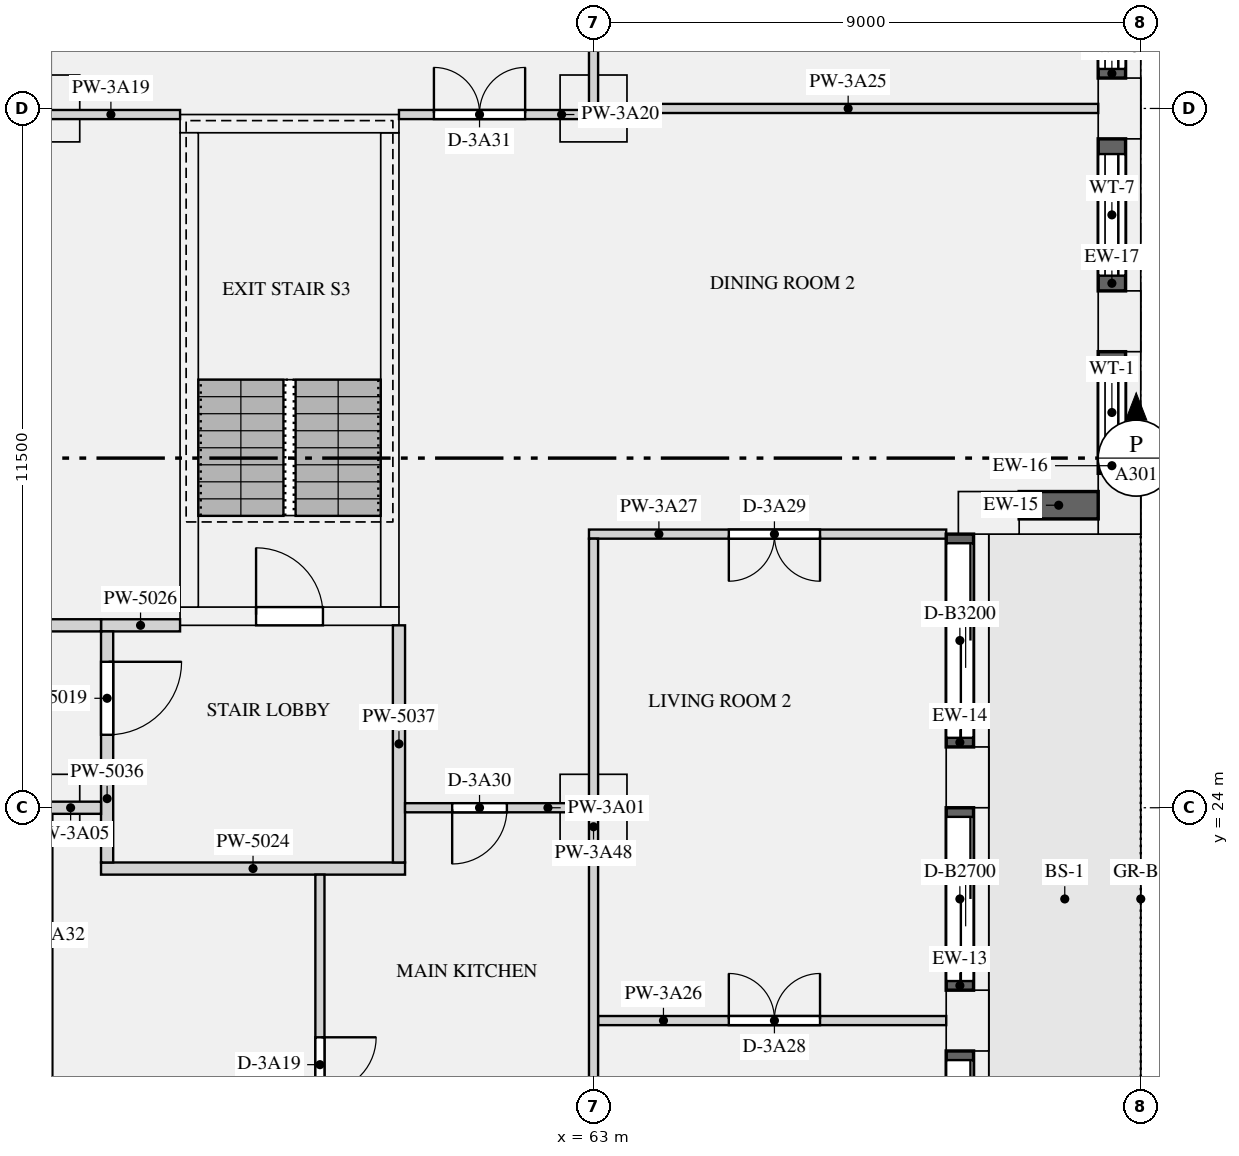
"""IFC4 building model, lengths in metres.
Left out: names, types, materials, properties, quantities, classifications, styles, units other than length and angle.
Written with IfcOpenShell. Run it as: python <this file> out.ifc"""

import sys

from ifc_helpers import new_model, si_unit, direction, frame, frame_2d, origin, origin_2d, place, context, subcontext, project, spatial, rectangle, extrude, element, fill, save


model = new_model("IFC4")
c1 = context("Model", 3, precision=1e-05, world=origin(), true_north=direction((0.0, 1.0)))
c2 = subcontext(c1, "Body", "Model", "MODEL_VIEW")
j1 = project(units=[si_unit("LENGTHUNIT", "METRE"), si_unit("PLANEANGLEUNIT", "RADIAN")], contexts=[c1])
p1 = place(None, origin())
s1 = spatial("IfcSite", under=j1, at=p1, CompositionType="ELEMENT")
p2 = place(p1, origin())
s2 = spatial("IfcBuilding", under=s1, at=p2, CompositionType="ELEMENT")
p3 = place(p2, frame((0.0, 0.0, 144.45)))
s3 = spatial("IfcBuildingStorey", under=s2, at=p3, CompositionType="ELEMENT", Elevation=144.45)
for number, where, z_axis, x_axis in (
    (1, (69.15, 20.5, 0.0), (0.0, 0.0, 1.0), (0.0, 1.0, 0.0)),
    (2, (69.15, 24.5, 0.0), (0.0, 0.0, 1.0), (0.0, 1.0, 0.0)),
    (3, (69.5, 28.85, 0.0), (0.0, 0.0, 1.0), (1.0, 0.0, 0.0)),
    (4, (71.65, 29.0, 0.0), (0.0, 0.0, 1.0), (0.0, 1.0, 0.0)),
    (5, (71.65, 32.0, 0.0), (0.0, 0.0, 1.0), (0.0, 1.0, 0.0)),
    (6, (71.65, 35.5, 0.0), (0.0, 0.0, 1.0), (0.0, 1.0, 0.0)),
):
    element("IfcColumn", number, at=place(p3, frame(where, z_axis=z_axis, x_axis=x_axis)), inside=s3, PredefinedType="USERDEFINED", context=c2, shape_type="SweptSolid", body=[
        extrude(rectangle(XDim=1.0, YDim=0.7, at=origin_2d()), origin(), (0.0, 0.0, 1.0), 3.15),
    ])
for number, where, z_axis, x_axis in (
    (7, (54.0, 24.0, 0.0), (0.0, 0.0, 1.0), (1.0, 0.0, 0.0)),
    (8, (63.0, 24.0, 0.0), (0.0, 0.0, 1.0), (1.0, 0.0, 0.0)),
    (9, (54.0, 35.5, 0.0), (0.0, 0.0, 1.0), (1.0, 0.0, 0.0)),
    (10, (63.0, 35.5, 0.0), (0.0, 0.0, 1.0), (1.0, 0.0, 0.0)),
):
    element("IfcColumn", number, at=place(p3, frame(where, z_axis=z_axis, x_axis=x_axis)), inside=s3, PredefinedType="COLUMN", context=c2, shape_type="SweptSolid", body=[
        extrude(rectangle(XDim=1.1, YDim=1.1, at=origin_2d()), origin(), (0.0, 0.0, 1.0), 3.15),
    ])
p4 = place(p3, frame((56.2, 27.15, 0.0), z_axis=(0.0, 0.0, 1.0), x_axis=(1.0, 0.0, 0.0)))
e11 = element("IfcWall", 11, at=p4, inside=s3, PredefinedType="SHEAR", context=c2, shape_type="SweptSolid", body=[
    extrude(rectangle(XDim=3.6, YDim=0.3, at=frame_2d((1.8, 0.0))), origin(), (0.0, 0.0, 1.0), 3.15),
])
p5 = place(p4, frame((1.25, 0.0, 0.0)))
e12 = element("IfcOpeningElement", 12, at=p5, cuts=e11, PredefinedType="OPENING", context=c2, shape_type="SweptSolid", body=[
    extrude(rectangle(XDim=1.1, YDim=2.1, at=frame_2d((0.55, 1.05))), frame((0.0, 0.16, 0.0), z_axis=(0.0, -1.0, 0.0), x_axis=(1.0, 0.0, 0.0)), (0.0, 0.0, 1.0), 0.32),
])
p6 = place(p3, frame((56.2, 35.25, 0.0), z_axis=(0.0, 0.0, 1.0), x_axis=(1.0, 0.0, 0.0)))
e13 = element("IfcWall", 13, at=p6, inside=s3, PredefinedType="SHEAR", context=c2, shape_type="SweptSolid", body=[
    extrude(rectangle(XDim=3.6, YDim=0.3, at=frame_2d((1.8, 0.0))), origin(), (0.0, 0.0, 1.0), 3.15),
])
for number, where, z_axis, x_axis in (
    (14, (56.35, 27.3, 0.0), (0.0, 0.0, 1.0), (0.0, 1.0, 0.0)),
    (15, (59.65, 27.3, 0.0), (0.0, 0.0, 1.0), (0.0, 1.0, 0.0)),
):
    element("IfcWall", number, at=place(p3, frame(where, z_axis=z_axis, x_axis=x_axis)), inside=s3, PredefinedType="SHEAR", context=c2, shape_type="SweptSolid", body=[
        extrude(rectangle(XDim=7.8, YDim=0.3, at=frame_2d((3.9, 0.0))), origin(), (0.0, 0.0, 1.0), 3.15),
    ])
p7 = place(p3, frame((69.025, 17.0, 0.0), z_axis=(0.0, 0.0, 1.0), x_axis=(0.0, 1.0, 0.0)))
e16 = element("IfcWall", 16, at=p7, inside=s3, PredefinedType="SOLIDWALL", context=c2, shape_type="SweptSolid", body=[
    extrude(rectangle(XDim=3.0, YDim=0.45, at=frame_2d((1.5, 0.0))), origin(), (0.0, 0.0, 1.0), 2.83),
])
p8 = place(p7, frame((0.15, 0.0, 0.0)))
e17 = element("IfcOpeningElement", 17, at=p8, cuts=e16, PredefinedType="OPENING", context=c2, shape_type="SweptSolid", body=[
    extrude(rectangle(XDim=2.7, YDim=2.3, at=frame_2d((1.35, 1.15))), frame((0.0, 0.235, 0.0), z_axis=(0.0, -1.0, 0.0), x_axis=(1.0, 0.0, 0.0)), (0.0, 0.0, 1.0), 0.47),
])
p9 = place(p3, frame((69.025, 21.0, 0.0), z_axis=(0.0, 0.0, 1.0), x_axis=(0.0, 1.0, 0.0)))
e18 = element("IfcWall", 18, at=p9, inside=s3, PredefinedType="SOLIDWALL", context=c2, shape_type="SweptSolid", body=[
    extrude(rectangle(XDim=3.0, YDim=0.45, at=frame_2d((1.5, 0.0))), origin(), (0.0, 0.0, 1.0), 2.83),
])
p10 = place(p9, frame((0.15, 0.0, 0.0)))
e19 = element("IfcOpeningElement", 19, at=p10, cuts=e18, PredefinedType="OPENING", context=c2, shape_type="SweptSolid", body=[
    extrude(rectangle(XDim=2.7, YDim=2.3, at=frame_2d((1.35, 1.15))), frame((0.0, 0.235, 0.0), z_axis=(0.0, -1.0, 0.0), x_axis=(1.0, 0.0, 0.0)), (0.0, 0.0, 1.0), 0.47),
])
p11 = place(p3, frame((69.025, 25.0, 0.0), z_axis=(0.0, 0.0, 1.0), x_axis=(0.0, 1.0, 0.0)))
e20 = element("IfcWall", 20, at=p11, inside=s3, PredefinedType="SOLIDWALL", context=c2, shape_type="SweptSolid", body=[
    extrude(rectangle(XDim=3.5, YDim=0.45, at=frame_2d((1.75, 0.0))), origin(), (0.0, 0.0, 1.0), 2.83),
])
p12 = place(p11, frame((0.15, 0.0, 0.0)))
e21 = element("IfcOpeningElement", 21, at=p12, cuts=e20, PredefinedType="OPENING", context=c2, shape_type="SweptSolid", body=[
    extrude(rectangle(XDim=3.2, YDim=2.3, at=frame_2d((1.6, 1.15))), frame((0.0, 0.235, 0.0), z_axis=(0.0, -1.0, 0.0), x_axis=(1.0, 0.0, 0.0)), (0.0, 0.0, 1.0), 0.47),
])
p13 = place(p3, frame((70.0, 28.975, 0.9), z_axis=(0.0, 0.0, 1.0), x_axis=(1.0, 0.0, 0.0)))
e22 = element("IfcWall", 22, at=p13, inside=s3, PredefinedType="SOLIDWALL", context=c2, shape_type="SweptSolid", body=[
    extrude(rectangle(XDim=1.3, YDim=0.45, at=frame_2d((0.65, 0.0))), origin(), (0.0, 0.0, 1.0), 1.93),
])
p14 = place(p3, frame((71.525, 29.5, 0.9), z_axis=(0.0, 0.0, 1.0), x_axis=(0.0, 1.0, 0.0)))
e23 = element("IfcWall", 23, at=p14, inside=s3, PredefinedType="SOLIDWALL", context=c2, shape_type="SweptSolid", body=[
    extrude(rectangle(XDim=2.0, YDim=0.45, at=frame_2d((1.0, 0.0))), origin(), (0.0, 0.0, 1.0), 1.93),
])
p15 = place(p14, frame((0.25, 0.0, 0.15)))
e24 = element("IfcOpeningElement", 24, at=p15, cuts=e23, PredefinedType="OPENING", context=c2, shape_type="SweptSolid", body=[
    extrude(rectangle(XDim=1.5, YDim=1.5, at=frame_2d((0.75, 0.75))), frame((0.0, 0.235, 0.0), z_axis=(0.0, -1.0, 0.0), x_axis=(1.0, 0.0, 0.0)), (0.0, 0.0, 1.0), 0.47),
])
p16 = place(p3, frame((71.525, 32.5, 0.9), z_axis=(0.0, 0.0, 1.0), x_axis=(0.0, 1.0, 0.0)))
e25 = element("IfcWall", 25, at=p16, inside=s3, PredefinedType="SOLIDWALL", context=c2, shape_type="SweptSolid", body=[
    extrude(rectangle(XDim=2.5, YDim=0.45, at=frame_2d((1.25, 0.0))), origin(), (0.0, 0.0, 1.0), 1.93),
])
p17 = place(p16, frame((0.25, 0.0, 0.15)))
e26 = element("IfcOpeningElement", 26, at=p17, cuts=e25, PredefinedType="OPENING", context=c2, shape_type="SweptSolid", body=[
    extrude(rectangle(XDim=2.0, YDim=1.5, at=frame_2d((1.0, 0.75))), frame((0.0, 0.235, 0.0), z_axis=(0.0, -1.0, 0.0), x_axis=(1.0, 0.0, 0.0)), (0.0, 0.0, 1.0), 0.47),
])
p18 = place(p3, frame((71.525, 36.0, 0.9), z_axis=(0.0, 0.0, 1.0), x_axis=(0.0, 1.0, 0.0)))
e27 = element("IfcWall", 27, at=p18, inside=s3, PredefinedType="SOLIDWALL", context=c2, shape_type="SweptSolid", body=[
    extrude(rectangle(XDim=2.3, YDim=0.45, at=frame_2d((1.15, 0.0))), origin(), (0.0, 0.0, 1.0), 1.93),
])
p19 = place(p18, frame((0.15, 0.0, 0.15)))
e28 = element("IfcOpeningElement", 28, at=p19, cuts=e27, PredefinedType="OPENING", context=c2, shape_type="SweptSolid", body=[
    extrude(rectangle(XDim=2.0, YDim=1.5, at=frame_2d((1.0, 0.75))), frame((0.0, 0.235, 0.0), z_axis=(0.0, -1.0, 0.0), x_axis=(1.0, 0.0, 0.0)), (0.0, 0.0, 1.0), 0.47),
])
p20 = place(p3, frame((54.9, 23.0, 0.0), z_axis=(0.0, 0.0, 1.0), x_axis=(1.0, 0.0, 0.0)))
e29 = element("IfcWall", 29, at=p20, inside=s3, PredefinedType="PARTITIONING", context=c2, shape_type="SweptSolid", body=[
    extrude(rectangle(XDim=5.0, YDim=0.2, at=frame_2d((2.5, 0.0))), origin(), (0.0, 0.0, 1.0), 2.83),
])
p21 = place(p3, frame((54.9, 27.0, 0.0), z_axis=(0.0, 0.0, 1.0), x_axis=(1.0, 0.0, 0.0)))
e30 = element("IfcWall", 30, at=p21, inside=s3, PredefinedType="PARTITIONING", context=c2, shape_type="SweptSolid", body=[
    extrude(rectangle(XDim=1.3, YDim=0.2, at=frame_2d((0.65, 0.0))), origin(), (0.0, 0.0, 1.0), 2.83),
])
p22 = place(p3, frame((55.0, 23.1, 0.0), z_axis=(0.0, 0.0, 1.0), x_axis=(0.0, 1.0, 0.0)))
e31 = element("IfcWall", 31, at=p22, inside=s3, PredefinedType="PARTITIONING", context=c2, shape_type="SweptSolid", body=[
    extrude(rectangle(XDim=3.8, YDim=0.2, at=frame_2d((1.9, 0.0))), origin(), (0.0, 0.0, 1.0), 2.83),
])
p23 = place(p22, frame((2.1, 0.0, 0.0)))
e32 = element("IfcOpeningElement", 32, at=p23, cuts=e31, PredefinedType="OPENING", context=c2, shape_type="SweptSolid", body=[
    extrude(rectangle(XDim=1.2, YDim=2.1, at=frame_2d((0.6, 1.05))), frame((0.0, 0.11, 0.0), z_axis=(0.0, -1.0, 0.0), x_axis=(1.0, 0.0, 0.0)), (0.0, 0.0, 1.0), 0.22),
])
p24 = place(p3, frame((59.8, 23.1, 0.0), z_axis=(0.0, 0.0, 1.0), x_axis=(0.0, 1.0, 0.0)))
e33 = element("IfcWall", 33, at=p24, inside=s3, PredefinedType="PARTITIONING", context=c2, shape_type="SweptSolid", body=[
    extrude(rectangle(XDim=3.9, YDim=0.2, at=frame_2d((1.95, 0.0))), origin(), (0.0, 0.0, 1.0), 2.83),
])
p25 = place(p3, frame((59.9, 24.0, 0.0), z_axis=(0.0, 0.0, 1.0), x_axis=(1.0, 0.0, 0.0)))
e34 = element("IfcWall", 34, at=p25, inside=s3, PredefinedType="PARTITIONING", context=c2, shape_type="SweptSolid", body=[
    extrude(rectangle(XDim=3.025, YDim=0.15, at=frame_2d((1.513, 0.0))), origin(), (0.0, 0.0, 1.0), 2.83),
])
p26 = place(p25, frame((0.775, 0.0, 0.0)))
e35 = element("IfcOpeningElement", 35, at=p26, cuts=e34, PredefinedType="OPENING", context=c2, shape_type="SweptSolid", body=[
    extrude(rectangle(XDim=0.9, YDim=2.1, at=frame_2d((0.45, 1.05))), frame((0.0, 0.085, 0.0), z_axis=(0.0, -1.0, 0.0), x_axis=(1.0, 0.0, 0.0)), (0.0, 0.0, 1.0), 0.17),
])
p27 = place(p3, frame((53.9, 24.0, 0.0), z_axis=(0.0, 0.0, 1.0), x_axis=(1.0, 0.0, 0.0)))
e36 = element("IfcWall", 36, at=p27, inside=s3, PredefinedType="PARTITIONING", context=c2, shape_type="SweptSolid", body=[
    extrude(rectangle(XDim=1.0, YDim=0.2, at=frame_2d((0.5, 0.0))), origin(), (0.0, 0.0, 1.0), 2.83),
])
p28 = place(p3, frame((47.925, 27.0, 0.0), z_axis=(0.0, 0.0, 1.0), x_axis=(1.0, 0.0, 0.0)))
e37 = element("IfcWall", 37, at=p28, inside=s3, PredefinedType="PARTITIONING", context=c2, shape_type="SweptSolid", body=[
    extrude(rectangle(XDim=6.975, YDim=0.2, at=frame_2d((3.487, 0.0))), origin(), (0.0, 0.0, 1.0), 2.83),
])
p29 = place(p3, frame((53.925, 35.4, 0.0), z_axis=(0.0, 0.0, 1.0), x_axis=(1.0, 0.0, 0.0)))
e38 = element("IfcWall", 38, at=p29, inside=s3, PredefinedType="PARTITIONING", context=c2, shape_type="SweptSolid", body=[
    extrude(rectangle(XDim=2.275, YDim=0.15, at=frame_2d((1.137, 0.0))), origin(), (0.0, 0.0, 1.0), 2.83),
])
p30 = place(p3, frame((59.8, 35.4, 0.0), z_axis=(0.0, 0.0, 1.0), x_axis=(1.0, 0.0, 0.0)))
e39 = element("IfcWall", 39, at=p30, inside=s3, PredefinedType="PARTITIONING", context=c2, shape_type="SweptSolid", body=[
    extrude(rectangle(XDim=3.275, YDim=0.15, at=frame_2d((1.637, 0.0))), origin(), (0.0, 0.0, 1.0), 2.83),
])
p31 = place(p30, frame((0.575, 0.0, 0.0)))
e40 = element("IfcOpeningElement", 40, at=p31, cuts=e39, PredefinedType="OPENING", context=c2, shape_type="SweptSolid", body=[
    extrude(rectangle(XDim=1.5, YDim=2.1, at=frame_2d((0.75, 1.05))), frame((0.0, 0.085, 0.0), z_axis=(0.0, -1.0, 0.0), x_axis=(1.0, 0.0, 0.0)), (0.0, 0.0, 1.0), 0.17),
])
p32 = place(p3, frame((63.075, 35.5, 0.0), z_axis=(0.0, 0.0, 1.0), x_axis=(1.0, 0.0, 0.0)))
e41 = element("IfcWall", 41, at=p32, inside=s3, PredefinedType="PARTITIONING", context=c2, shape_type="SweptSolid", body=[
    extrude(rectangle(XDim=8.225, YDim=0.15, at=frame_2d((4.113, 0.0))), origin(), (0.0, 0.0, 1.0), 2.83),
])
p33 = place(p3, frame((63.075, 20.5, 0.0), z_axis=(0.0, 0.0, 1.0), x_axis=(1.0, 0.0, 0.0)))
e42 = element("IfcWall", 42, at=p33, inside=s3, PredefinedType="PARTITIONING", context=c2, shape_type="SweptSolid", body=[
    extrude(rectangle(XDim=5.725, YDim=0.15, at=frame_2d((2.863, 0.0))), origin(), (0.0, 0.0, 1.0), 2.83),
])
p34 = place(p33, frame((2.15, 0.0, 0.0)))
e43 = element("IfcOpeningElement", 43, at=p34, cuts=e42, PredefinedType="OPENING", context=c2, shape_type="SweptSolid", body=[
    extrude(rectangle(XDim=1.5, YDim=2.1, at=frame_2d((0.75, 1.05))), frame((0.0, 0.085, 0.0), z_axis=(0.0, -1.0, 0.0), x_axis=(1.0, 0.0, 0.0)), (0.0, 0.0, 1.0), 0.17),
])
p35 = place(p3, frame((62.925, 28.5, 0.0), z_axis=(0.0, 0.0, 1.0), x_axis=(1.0, 0.0, 0.0)))
e44 = element("IfcWall", 44, at=p35, inside=s3, PredefinedType="PARTITIONING", context=c2, shape_type="SweptSolid", body=[
    extrude(rectangle(XDim=5.875, YDim=0.15, at=frame_2d((2.938, 0.0))), origin(), (0.0, 0.0, 1.0), 2.83),
])
p36 = place(p35, frame((2.3, 0.0, 0.0)))
e45 = element("IfcOpeningElement", 45, at=p36, cuts=e44, PredefinedType="OPENING", context=c2, shape_type="SweptSolid", body=[
    extrude(rectangle(XDim=1.5, YDim=2.1, at=frame_2d((0.75, 1.05))), frame((0.0, 0.085, 0.0), z_axis=(0.0, -1.0, 0.0), x_axis=(1.0, 0.0, 0.0)), (0.0, 0.0, 1.0), 0.17),
])
p37 = place(p3, frame((58.5, 12.575, 0.0), z_axis=(0.0, 0.0, 1.0), x_axis=(0.0, 1.0, 0.0)))
e46 = element("IfcWall", 46, at=p37, inside=s3, PredefinedType="PARTITIONING", context=c2, shape_type="SweptSolid", body=[
    extrude(rectangle(XDim=10.325, YDim=0.15, at=frame_2d((5.163, 0.0))), origin(), (0.0, 0.0, 1.0), 2.83),
])
p38 = place(p37, frame((6.75, 0.0, 0.0)))
e47 = element("IfcOpeningElement", 47, at=p38, cuts=e46, PredefinedType="OPENING", context=c2, shape_type="SweptSolid", body=[
    extrude(rectangle(XDim=0.9, YDim=2.1, at=frame_2d((0.45, 1.05))), frame((0.0, 0.085, 0.0), z_axis=(0.0, -1.0, 0.0), x_axis=(1.0, 0.0, 0.0)), (0.0, 0.0, 1.0), 0.17),
])
p39 = place(p3, frame((63.0, 12.575, 0.0), z_axis=(0.0, 0.0, 1.0), x_axis=(0.0, 1.0, 0.0)))
e48 = element("IfcWall", 48, at=p39, inside=s3, PredefinedType="PARTITIONING", context=c2, shape_type="SweptSolid", body=[
    extrude(rectangle(XDim=15.85, YDim=0.15, at=frame_2d((7.925, 0.0))), origin(), (0.0, 0.0, 1.0), 2.83),
])
p40 = place(p39, frame((5.475, 0.0, 0.0)))
e49 = element("IfcOpeningElement", 49, at=p40, cuts=e48, PredefinedType="OPENING", context=c2, shape_type="SweptSolid", body=[
    extrude(rectangle(XDim=0.9, YDim=2.1, at=frame_2d((0.45, 1.05))), frame((0.0, 0.085, 0.0), z_axis=(0.0, -1.0, 0.0), x_axis=(1.0, 0.0, 0.0)), (0.0, 0.0, 1.0), 0.17),
])
p41 = place(p3, frame((63.0, 35.475, 0.0), z_axis=(0.0, 0.0, 1.0), x_axis=(0.0, 1.0, 0.0)))
e50 = element("IfcWall", 50, at=p41, inside=s3, PredefinedType="PARTITIONING", context=c2, shape_type="SweptSolid", body=[
    extrude(rectangle(XDim=7.325, YDim=0.15, at=frame_2d((3.663, 0.0))), origin(), (0.0, 0.0, 1.0), 2.83),
])
p42 = place(p41, frame((3.275, 0.0, 0.0)))
e51 = element("IfcOpeningElement", 51, at=p42, cuts=e50, PredefinedType="OPENING", context=c2, shape_type="SweptSolid", body=[
    extrude(rectangle(XDim=1.5, YDim=2.1, at=frame_2d((0.75, 1.05))), frame((0.0, 0.085, 0.0), z_axis=(0.0, -1.0, 0.0), x_axis=(1.0, 0.0, 0.0)), (0.0, 0.0, 1.0), 0.17),
])
p43 = place(p8, origin())
e52 = element("IfcDoor", 52, at=p43, inside=s3, OperationType="SLIDING_TO_LEFT", PredefinedType="DOOR", context=c2, shape_type="SweptSolid", body=[
    extrude(rectangle(XDim=2.7, YDim=2.3, at=frame_2d((1.35, 1.15))), frame((0.0, -0.07, 0.0), z_axis=(0.0, -1.0, 0.0), x_axis=(1.0, 0.0, 0.0)), (0.0, 0.0, 1.0), 0.05),
])
fill(e17, e52)
p44 = place(p10, origin())
e53 = element("IfcDoor", 53, at=p44, inside=s3, OperationType="SLIDING_TO_LEFT", PredefinedType="DOOR", context=c2, shape_type="SweptSolid", body=[
    extrude(rectangle(XDim=2.7, YDim=2.3, at=frame_2d((1.35, 1.15))), frame((0.0, -0.07, 0.0), z_axis=(0.0, -1.0, 0.0), x_axis=(1.0, 0.0, 0.0)), (0.0, 0.0, 1.0), 0.05),
])
fill(e19, e53)
p45 = place(p12, origin())
e54 = element("IfcDoor", 54, at=p45, inside=s3, OperationType="SLIDING_TO_LEFT", PredefinedType="DOOR", context=c2, shape_type="SweptSolid", body=[
    extrude(rectangle(XDim=3.2, YDim=2.3, at=frame_2d((1.6, 1.15))), frame((0.0, -0.07, 0.0), z_axis=(0.0, -1.0, 0.0), x_axis=(1.0, 0.0, 0.0)), (0.0, 0.0, 1.0), 0.05),
])
fill(e21, e54)
p46 = place(p15, origin())
e55 = element("IfcWindow", 55, at=p46, inside=s3, PartitioningType="SINGLE_PANEL", PredefinedType="WINDOW", context=c2, shape_type="SweptSolid", body=[
    extrude(rectangle(XDim=1.5, YDim=1.5, at=frame_2d((0.75, 0.75))), frame((0.0, -0.065, 0.0), z_axis=(0.0, -1.0, 0.0), x_axis=(1.0, 0.0, 0.0)), (0.0, 0.0, 1.0), 0.06),
])
fill(e24, e55)
p47 = place(p17, origin())
e56 = element("IfcWindow", 56, at=p47, inside=s3, PartitioningType="SINGLE_PANEL", PredefinedType="WINDOW", context=c2, shape_type="SweptSolid", body=[
    extrude(rectangle(XDim=2.0, YDim=1.5, at=frame_2d((1.0, 0.75))), frame((0.0, -0.065, 0.0), z_axis=(0.0, -1.0, 0.0), x_axis=(1.0, 0.0, 0.0)), (0.0, 0.0, 1.0), 0.06),
])
fill(e26, e56)
p48 = place(p19, origin())
e57 = element("IfcWindow", 57, at=p48, inside=s3, PartitioningType="SINGLE_PANEL", PredefinedType="WINDOW", context=c2, shape_type="SweptSolid", body=[
    extrude(rectangle(XDim=2.0, YDim=1.5, at=frame_2d((1.0, 0.75))), frame((0.0, -0.065, 0.0), z_axis=(0.0, -1.0, 0.0), x_axis=(1.0, 0.0, 0.0)), (0.0, 0.0, 1.0), 0.06),
])
fill(e28, e57)
p49 = place(p5, origin())
e58 = element("IfcDoor", 58, at=p49, inside=s3, OperationType="SINGLE_SWING_LEFT", PredefinedType="DOOR", context=c2, shape_type="SweptSolid", body=[
    extrude(rectangle(XDim=1.1, YDim=2.1, at=frame_2d((0.55, 1.05))), frame((0.0, 0.025, 0.0), z_axis=(0.0, -1.0, 0.0), x_axis=(1.0, 0.0, 0.0)), (0.0, 0.0, 1.0), 0.05),
])
fill(e12, e58)
p50 = place(p23, frame((1.2, 0.0, 0.0), z_axis=(0.0, 0.0, 1.0), x_axis=(-1.0, 0.0, 0.0)))
e59 = element("IfcDoor", 59, at=p50, inside=s3, OperationType="SINGLE_SWING_LEFT", PredefinedType="DOOR", context=c2, shape_type="SweptSolid", body=[
    extrude(rectangle(XDim=1.2, YDim=2.1, at=frame_2d((0.6, 1.05))), frame((0.0, 0.025, 0.0), z_axis=(0.0, -1.0, 0.0), x_axis=(1.0, 0.0, 0.0)), (0.0, 0.0, 1.0), 0.05),
])
fill(e32, e59)
p51 = place(p38, frame((0.9, 0.0, 0.0), z_axis=(0.0, 0.0, 1.0), x_axis=(-1.0, 0.0, 0.0)))
e60 = element("IfcDoor", 60, at=p51, inside=s3, OperationType="SINGLE_SWING_LEFT", PredefinedType="DOOR", context=c2, shape_type="SweptSolid", body=[
    extrude(rectangle(XDim=0.9, YDim=2.1, at=frame_2d((0.45, 1.05))), frame((0.0, 0.025, 0.0), z_axis=(0.0, -1.0, 0.0), x_axis=(1.0, 0.0, 0.0)), (0.0, 0.0, 1.0), 0.05),
])
fill(e47, e60)
p52 = place(p34, origin())
e61 = element("IfcDoor", 61, at=p52, inside=s3, OperationType="DOUBLE_DOOR_SINGLE_SWING", PredefinedType="DOOR", context=c2, shape_type="SweptSolid", body=[
    extrude(rectangle(XDim=1.5, YDim=2.1, at=frame_2d((0.75, 1.05))), frame((0.0, 0.025, 0.0), z_axis=(0.0, -1.0, 0.0), x_axis=(1.0, 0.0, 0.0)), (0.0, 0.0, 1.0), 0.05),
])
fill(e43, e61)
p53 = place(p36, frame((1.5, 0.0, 0.0), z_axis=(0.0, 0.0, 1.0), x_axis=(-1.0, 0.0, 0.0)))
e62 = element("IfcDoor", 62, at=p53, inside=s3, OperationType="DOUBLE_DOOR_SINGLE_SWING", PredefinedType="DOOR", context=c2, shape_type="SweptSolid", body=[
    extrude(rectangle(XDim=1.5, YDim=2.1, at=frame_2d((0.75, 1.05))), frame((0.0, 0.025, 0.0), z_axis=(0.0, -1.0, 0.0), x_axis=(1.0, 0.0, 0.0)), (0.0, 0.0, 1.0), 0.05),
])
fill(e45, e62)
p54 = place(p26, frame((0.9, 0.0, 0.0), z_axis=(0.0, 0.0, 1.0), x_axis=(-1.0, 0.0, 0.0)))
e63 = element("IfcDoor", 63, at=p54, inside=s3, OperationType="SINGLE_SWING_RIGHT", PredefinedType="DOOR", context=c2, shape_type="SweptSolid", body=[
    extrude(rectangle(XDim=0.9, YDim=2.1, at=frame_2d((0.45, 1.05))), frame((0.0, 0.025, 0.0), z_axis=(0.0, -1.0, 0.0), x_axis=(1.0, 0.0, 0.0)), (0.0, 0.0, 1.0), 0.05),
])
fill(e35, e63)
p55 = place(p31, origin())
e64 = element("IfcDoor", 64, at=p55, inside=s3, OperationType="DOUBLE_DOOR_SINGLE_SWING", PredefinedType="DOOR", context=c2, shape_type="SweptSolid", body=[
    extrude(rectangle(XDim=1.5, YDim=2.1, at=frame_2d((0.75, 1.05))), frame((0.0, 0.025, 0.0), z_axis=(0.0, -1.0, 0.0), x_axis=(1.0, 0.0, 0.0)), (0.0, 0.0, 1.0), 0.05),
])
fill(e40, e64)
save(model, sys.argv[1])
